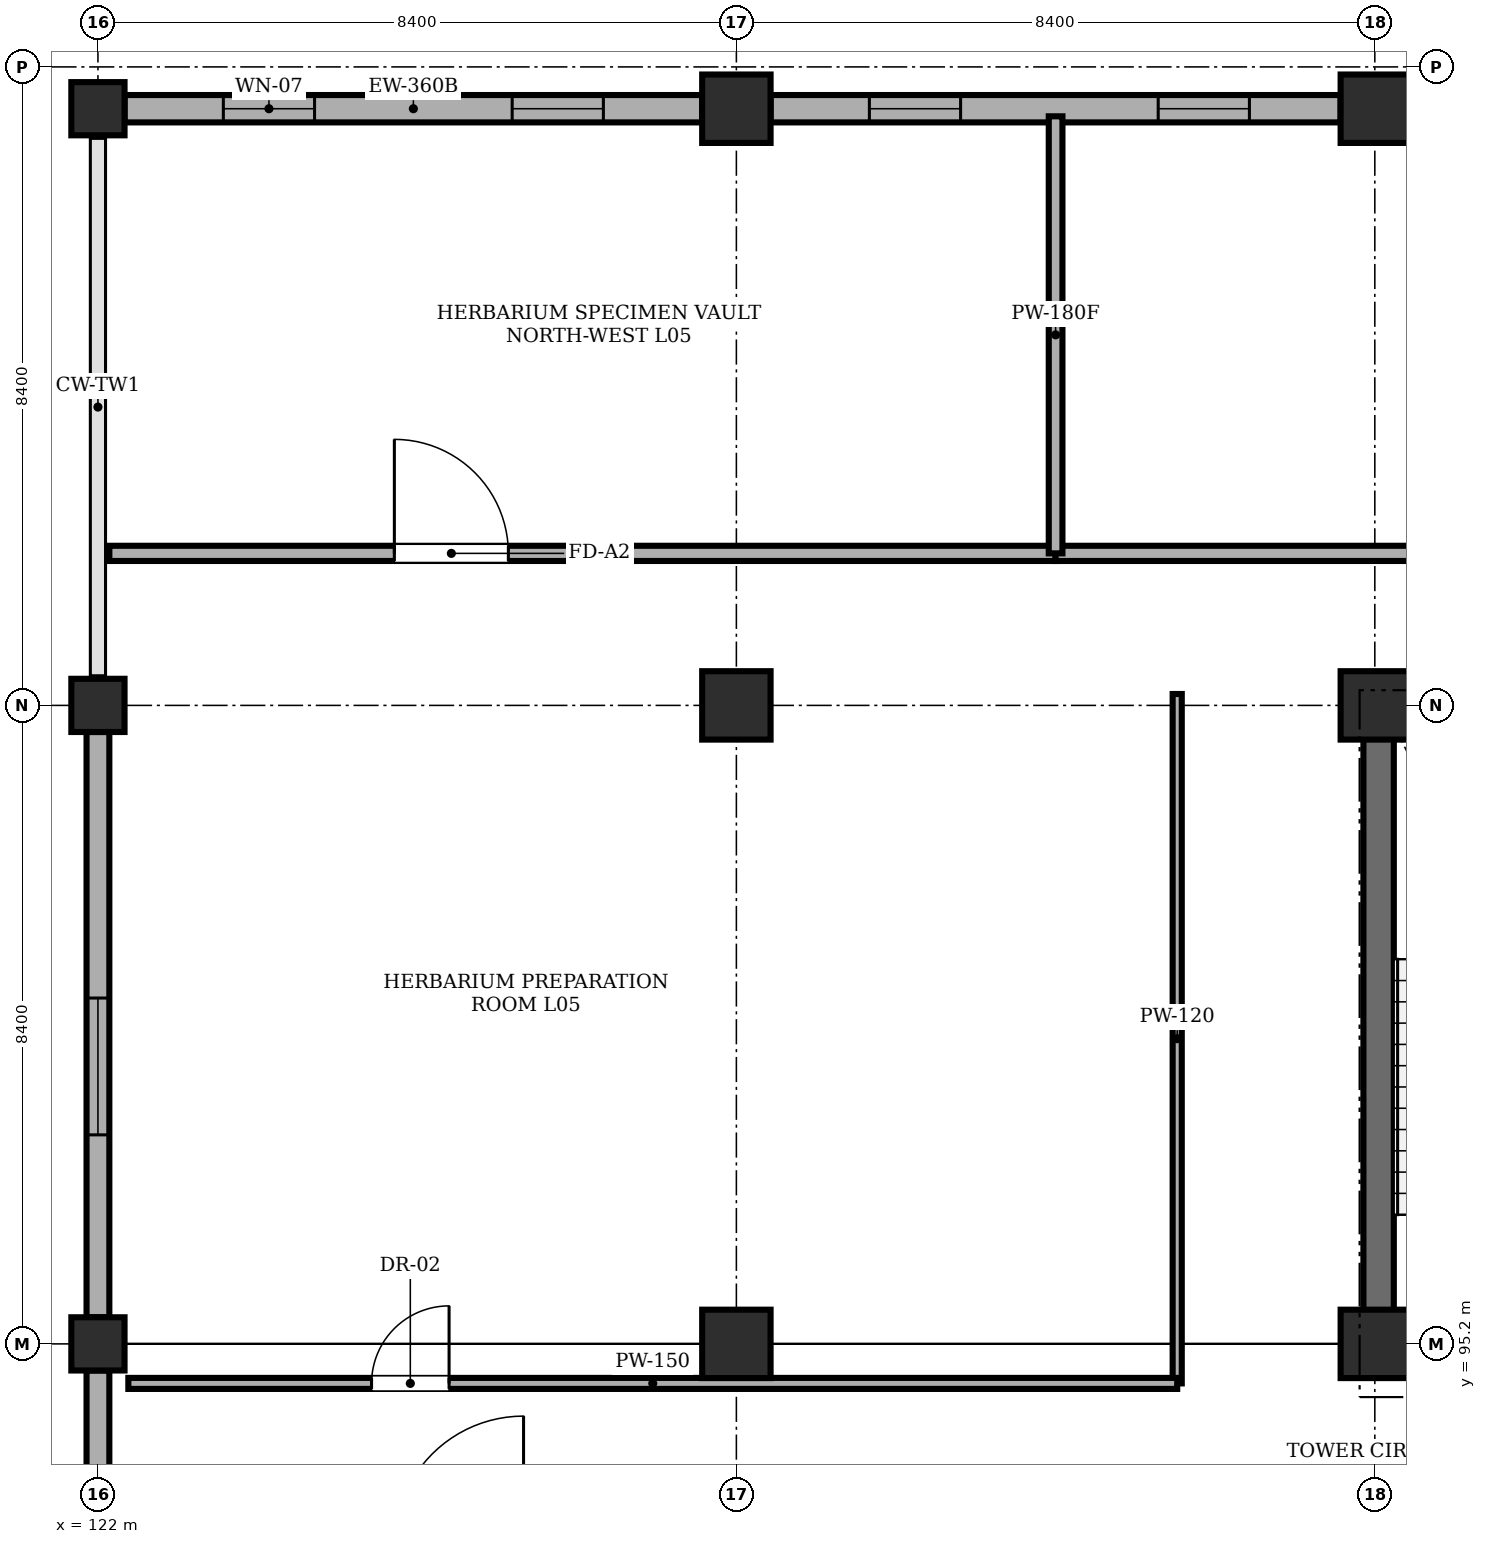
"""IFC4 building model, lengths in metres.
Left out: names, types, materials, properties, quantities, classifications, styles, units other than length and angle.
Written with IfcOpenShell. Run it as: python <this file> out.ifc"""

import sys

from ifc_helpers import new_model, si_unit, direction, frame, frame_2d, origin, origin_2d, place, context, subcontext, project, spatial, rectangle, extrude, element, fill, save


model = new_model("IFC4")
c1 = context("Model", 3, precision=1e-05, world=origin(), true_north=direction((0.0, 1.0)))
c2 = subcontext(c1, "Body", "Model", "MODEL_VIEW")
j1 = project(units=[si_unit("LENGTHUNIT", "METRE"), si_unit("PLANEANGLEUNIT", "RADIAN")], contexts=[c1])
p1 = place(None, origin())
s1 = spatial("IfcSite", under=j1, at=p1, CompositionType="ELEMENT")
p2 = place(p1, origin())
s2 = spatial("IfcBuilding", under=s1, at=p2, CompositionType="ELEMENT")
p3 = place(p2, frame((0.0, 0.0, 19.2)))
s3 = spatial("IfcBuildingStorey", under=s2, at=p3, CompositionType="ELEMENT", Elevation=19.2)
for number, where, z_axis, x_axis in (
    (1, (122.0, 95.2, 0.0), (0.0, 0.0, 1.0), (1.0, 0.0, 0.0)),
    (2, (122.0, 103.6, 0.0), (0.0, 0.0, 1.0), (1.0, 0.0, 0.0)),
    (3, (122.0, 111.45, 0.0), (0.0, 0.0, 1.0), (1.0, 0.0, 0.0)),
):
    element("IfcColumn", number, at=place(p3, frame(where, z_axis=z_axis, x_axis=x_axis)), inside=s3, PredefinedType="COLUMN", context=c2, shape_type="SweptSolid", body=[
        extrude(rectangle(XDim=0.7, YDim=0.7, at=origin_2d()), origin(), (0.0, 0.0, 1.0), 4.02),
    ])
for number, where, z_axis, x_axis in (
    (4, (130.4, 95.2, 0.0), (0.0, 0.0, 1.0), (1.0, 0.0, 0.0)),
    (5, (130.4, 103.6, 0.0), (0.0, 0.0, 1.0), (1.0, 0.0, 0.0)),
    (6, (130.4, 111.45, 0.0), (0.0, 0.0, 1.0), (1.0, 0.0, 0.0)),
    (7, (138.8, 95.2, 0.0), (0.0, 0.0, 1.0), (1.0, 0.0, 0.0)),
    (8, (138.8, 103.6, 0.0), (0.0, 0.0, 1.0), (1.0, 0.0, 0.0)),
    (9, (138.8, 111.45, 0.0), (0.0, 0.0, 1.0), (1.0, 0.0, 0.0)),
):
    element("IfcColumn", number, at=place(p3, frame(where, z_axis=z_axis, x_axis=x_axis)), inside=s3, PredefinedType="COLUMN", context=c2, shape_type="SweptSolid", body=[
        extrude(rectangle(XDim=0.9, YDim=0.9, at=origin_2d()), origin(), (0.0, 0.0, 1.0), 4.02),
    ])
for number, where, z_axis, x_axis in (
    (10, (138.65, 95.25, 0.0), (0.0, 0.0, 1.0), (1.0, 0.0, 0.0)),
    (11, (138.65, 103.55, 0.0), (0.0, 0.0, 1.0), (1.0, 0.0, 0.0)),
):
    element("IfcWall", number, at=place(p3, frame(where, z_axis=z_axis, x_axis=x_axis)), inside=s3, PredefinedType="SHEAR", context=c2, shape_type="SweptSolid", body=[
        extrude(rectangle(XDim=3.9, YDim=0.4, at=frame_2d((1.95, 0.0))), origin(), (0.0, 0.0, 1.0), 4.02),
    ])
p4 = place(p3, frame((138.85, 95.45, 0.0), z_axis=(0.0, 0.0, 1.0), x_axis=(0.0, 1.0, 0.0)))
e12 = element("IfcWall", 12, at=p4, inside=s3, PredefinedType="SHEAR", context=c2, shape_type="SweptSolid", body=[
    extrude(rectangle(XDim=7.9, YDim=0.4, at=frame_2d((3.95, 0.0))), origin(), (0.0, 0.0, 1.0), 4.02),
])
p5 = place(p3, frame((122.35, 111.45, 0.0), z_axis=(0.0, 0.0, 1.0), x_axis=(1.0, 0.0, 0.0)))
e13 = element("IfcWall", 13, at=p5, inside=s3, PredefinedType="STANDARD", context=c2, shape_type="SweptSolid", body=[
    extrude(rectangle(XDim=7.6, YDim=0.36, at=frame_2d((3.8, 0.0))), origin(), (0.0, 0.0, 1.0), 3.32),
])
p6 = place(p5, frame((1.3, 0.0, 1.1)))
e14 = element("IfcOpeningElement", 14, at=p6, cuts=e13, PredefinedType="OPENING", context=c2, shape_type="SweptSolid", body=[
    extrude(rectangle(XDim=1.2, YDim=1.5, at=frame_2d((0.6, 0.75))), frame((0.0, 0.19, 0.0), z_axis=(0.0, -1.0, 0.0), x_axis=(1.0, 0.0, 0.0)), (0.0, 0.0, 1.0), 0.38),
])
p7 = place(p5, frame((5.1, 0.0, 1.1)))
e15 = element("IfcOpeningElement", 15, at=p7, cuts=e13, PredefinedType="OPENING", context=c2, shape_type="SweptSolid", body=[
    extrude(rectangle(XDim=1.2, YDim=1.5, at=frame_2d((0.6, 0.75))), frame((0.0, 0.19, 0.0), z_axis=(0.0, -1.0, 0.0), x_axis=(1.0, 0.0, 0.0)), (0.0, 0.0, 1.0), 0.38),
])
p8 = place(p3, frame((130.85, 111.45, 0.0), z_axis=(0.0, 0.0, 1.0), x_axis=(1.0, 0.0, 0.0)))
e16 = element("IfcWall", 16, at=p8, inside=s3, PredefinedType="STANDARD", context=c2, shape_type="SweptSolid", body=[
    extrude(rectangle(XDim=7.5, YDim=0.36, at=frame_2d((3.75, 0.0))), origin(), (0.0, 0.0, 1.0), 3.32),
])
p9 = place(p8, frame((1.3, 0.0, 1.1)))
e17 = element("IfcOpeningElement", 17, at=p9, cuts=e16, PredefinedType="OPENING", context=c2, shape_type="SweptSolid", body=[
    extrude(rectangle(XDim=1.2, YDim=1.5, at=frame_2d((0.6, 0.75))), frame((0.0, 0.19, 0.0), z_axis=(0.0, -1.0, 0.0), x_axis=(1.0, 0.0, 0.0)), (0.0, 0.0, 1.0), 0.38),
])
p10 = place(p8, frame((5.1, 0.0, 1.1)))
e18 = element("IfcOpeningElement", 18, at=p10, cuts=e16, PredefinedType="OPENING", context=c2, shape_type="SweptSolid", body=[
    extrude(rectangle(XDim=1.2, YDim=1.5, at=frame_2d((0.6, 0.75))), frame((0.0, 0.19, 0.0), z_axis=(0.0, -1.0, 0.0), x_axis=(1.0, 0.0, 0.0)), (0.0, 0.0, 1.0), 0.38),
])
p11 = place(p3, frame((122.0, 87.15, 0.0), z_axis=(0.0, 0.0, 1.0), x_axis=(0.0, 1.0, 0.0)))
e19 = element("IfcWall", 19, at=p11, inside=s3, PredefinedType="STANDARD", context=c2, shape_type="SweptSolid", body=[
    extrude(rectangle(XDim=7.7, YDim=0.3, at=frame_2d((3.85, 0.0))), origin(), (0.0, 0.0, 1.0), 3.32),
])
p12 = place(p11, frame((2.4, 0.0, 0.95)))
e20 = element("IfcOpeningElement", 20, at=p12, cuts=e19, PredefinedType="OPENING", context=c2, shape_type="SweptSolid", body=[
    extrude(rectangle(XDim=1.5, YDim=1.8, at=frame_2d((0.75, 0.9))), frame((0.0, 0.16, 0.0), z_axis=(0.0, -1.0, 0.0), x_axis=(1.0, 0.0, 0.0)), (0.0, 0.0, 1.0), 0.32),
])
p13 = place(p3, frame((122.0, 95.55, 0.0), z_axis=(0.0, 0.0, 1.0), x_axis=(0.0, 1.0, 0.0)))
e21 = element("IfcWall", 21, at=p13, inside=s3, PredefinedType="STANDARD", context=c2, shape_type="SweptSolid", body=[
    extrude(rectangle(XDim=7.7, YDim=0.3, at=frame_2d((3.85, 0.0))), origin(), (0.0, 0.0, 1.0), 3.32),
])
p14 = place(p13, frame((2.4, 0.0, 1.0)))
e22 = element("IfcOpeningElement", 22, at=p14, cuts=e21, PredefinedType="OPENING", context=c2, shape_type="SweptSolid", body=[
    extrude(rectangle(XDim=1.8, YDim=1.8, at=frame_2d((0.9, 0.9))), frame((0.0, 0.16, 0.0), z_axis=(0.0, -1.0, 0.0), x_axis=(1.0, 0.0, 0.0)), (0.0, 0.0, 1.0), 0.32),
])
p15 = place(p3, frame((136.2, 94.68, 0.0), z_axis=(0.0, 0.0, 1.0), x_axis=(0.0, 1.0, 0.0)))
e23 = element("IfcWall", 23, at=p15, inside=s3, PredefinedType="PARTITIONING", context=c2, shape_type="SweptSolid", body=[
    extrude(rectangle(XDim=9.07, YDim=0.12, at=frame_2d((4.535, 0.0))), origin(), (0.0, 0.0, 1.0), 4.02),
])
p16 = place(p3, frame((122.4, 94.68, 0.0), z_axis=(0.0, 0.0, 1.0), x_axis=(1.0, 0.0, 0.0)))
e24 = element("IfcWall", 24, at=p16, inside=s3, PredefinedType="PARTITIONING", context=c2, shape_type="SweptSolid", body=[
    extrude(rectangle(XDim=13.8, YDim=0.145, at=frame_2d((6.9, 0.0))), origin(), (0.0, 0.0, 1.0), 4.02),
])
p17 = place(p16, frame((3.2, 0.0, 0.0)))
e25 = element("IfcOpeningElement", 25, at=p17, cuts=e24, PredefinedType="OPENING", context=c2, shape_type="SweptSolid", body=[
    extrude(rectangle(XDim=1.02, YDim=2.15, at=frame_2d((0.51, 1.075))), frame((0.0, 0.083, 0.0), z_axis=(0.0, -1.0, 0.0), x_axis=(1.0, 0.0, 0.0)), (0.0, 0.0, 1.0), 0.165),
])
p18 = place(p3, frame((122.15, 105.6, 0.0), z_axis=(0.0, 0.0, 1.0), x_axis=(1.0, 0.0, 0.0)))
e26 = element("IfcWall", 26, at=p18, inside=s3, PredefinedType="SOLIDWALL", context=c2, shape_type="SweptSolid", body=[
    extrude(rectangle(XDim=12.45, YDim=0.2, at=frame_2d((6.225, 0.0))), origin(), (0.0, 0.0, 1.0), 4.02),
])
p19 = place(p18, frame((3.75, 0.0, 0.0)))
e27 = element("IfcOpeningElement", 27, at=p19, cuts=e26, PredefinedType="OPENING", context=c2, shape_type="SweptSolid", body=[
    extrude(rectangle(XDim=1.5, YDim=2.2, at=frame_2d((0.75, 1.1))), frame((0.0, 0.11, 0.0), z_axis=(0.0, -1.0, 0.0), x_axis=(1.0, 0.0, 0.0)), (0.0, 0.0, 1.0), 0.22),
])
p20 = place(p3, frame((134.6, 105.6, 0.0), z_axis=(0.0, 0.0, 1.0), x_axis=(1.0, 0.0, 0.0)))
e28 = element("IfcWall", 28, at=p20, inside=s3, PredefinedType="SOLIDWALL", context=c2, shape_type="SweptSolid", body=[
    extrude(rectangle(XDim=16.8, YDim=0.2, at=frame_2d((8.4, 0.0))), origin(), (0.0, 0.0, 1.0), 4.02),
])
p21 = place(p20, frame((6.8, 0.0, 0.0)))
e29 = element("IfcOpeningElement", 29, at=p21, cuts=e28, PredefinedType="OPENING", context=c2, shape_type="SweptSolid", body=[
    extrude(rectangle(XDim=1.5, YDim=2.2, at=frame_2d((0.75, 1.1))), frame((0.0, 0.11, 0.0), z_axis=(0.0, -1.0, 0.0), x_axis=(1.0, 0.0, 0.0)), (0.0, 0.0, 1.0), 0.22),
])
p22 = place(p3, frame((134.6, 105.6, 0.0), z_axis=(0.0, 0.0, 1.0), x_axis=(0.0, 1.0, 0.0)))
e30 = element("IfcWall", 30, at=p22, inside=s3, PredefinedType="STANDARD", context=c2, shape_type="SweptSolid", body=[
    extrude(rectangle(XDim=5.75, YDim=0.18, at=frame_2d((2.875, 0.0))), origin(), (0.0, 0.0, 1.0), 3.52),
])
p23 = place(p6, origin())
e31 = element("IfcWindow", 31, at=p23, inside=s3, PartitioningType="SINGLE_PANEL", PredefinedType="WINDOW", context=c2, shape_type="SweptSolid", body=[
    extrude(rectangle(XDim=1.2, YDim=1.5, at=frame_2d((0.6, 0.75))), frame((0.0, 0.03, 0.0), z_axis=(0.0, -1.0, 0.0), x_axis=(1.0, 0.0, 0.0)), (0.0, 0.0, 1.0), 0.06),
])
fill(e14, e31)
p24 = place(p7, origin())
e32 = element("IfcWindow", 32, at=p24, inside=s3, PartitioningType="SINGLE_PANEL", PredefinedType="WINDOW", context=c2, shape_type="SweptSolid", body=[
    extrude(rectangle(XDim=1.2, YDim=1.5, at=frame_2d((0.6, 0.75))), frame((0.0, 0.03, 0.0), z_axis=(0.0, -1.0, 0.0), x_axis=(1.0, 0.0, 0.0)), (0.0, 0.0, 1.0), 0.06),
])
fill(e15, e32)
p25 = place(p9, origin())
e33 = element("IfcWindow", 33, at=p25, inside=s3, PartitioningType="SINGLE_PANEL", PredefinedType="WINDOW", context=c2, shape_type="SweptSolid", body=[
    extrude(rectangle(XDim=1.2, YDim=1.5, at=frame_2d((0.6, 0.75))), frame((0.0, 0.03, 0.0), z_axis=(0.0, -1.0, 0.0), x_axis=(1.0, 0.0, 0.0)), (0.0, 0.0, 1.0), 0.06),
])
fill(e17, e33)
p26 = place(p10, origin())
e34 = element("IfcWindow", 34, at=p26, inside=s3, PartitioningType="SINGLE_PANEL", PredefinedType="WINDOW", context=c2, shape_type="SweptSolid", body=[
    extrude(rectangle(XDim=1.2, YDim=1.5, at=frame_2d((0.6, 0.75))), frame((0.0, 0.03, 0.0), z_axis=(0.0, -1.0, 0.0), x_axis=(1.0, 0.0, 0.0)), (0.0, 0.0, 1.0), 0.06),
])
fill(e18, e34)
p27 = place(p14, origin())
e35 = element("IfcWindow", 35, at=p27, inside=s3, PartitioningType="DOUBLE_PANEL_VERTICAL", PredefinedType="WINDOW", context=c2, shape_type="SweptSolid", body=[
    extrude(rectangle(XDim=1.8, YDim=1.8, at=frame_2d((0.9, 0.9))), frame((0.0, 0.03, 0.0), z_axis=(0.0, -1.0, 0.0), x_axis=(1.0, 0.0, 0.0)), (0.0, 0.0, 1.0), 0.06),
])
fill(e22, e35)
p28 = place(p17, origin())
e36 = element("IfcDoor", 36, at=p28, inside=s3, OperationType="SINGLE_SWING_RIGHT", PredefinedType="DOOR", context=c2, shape_type="SweptSolid", body=[
    extrude(rectangle(XDim=1.02, YDim=2.15, at=frame_2d((0.51, 1.075))), frame((0.0, 0.025, 0.0), z_axis=(0.0, -1.0, 0.0), x_axis=(1.0, 0.0, 0.0)), (0.0, 0.0, 1.0), 0.05),
])
fill(e25, e36)
p29 = place(p19, origin())
e37 = element("IfcDoor", 37, at=p29, inside=s3, OperationType="SINGLE_SWING_LEFT", PredefinedType="DOOR", context=c2, shape_type="SweptSolid", body=[
    extrude(rectangle(XDim=1.5, YDim=2.2, at=frame_2d((0.75, 1.1))), frame((0.0, 0.025, 0.0), z_axis=(0.0, -1.0, 0.0), x_axis=(1.0, 0.0, 0.0)), (0.0, 0.0, 1.0), 0.05),
])
fill(e27, e37)
save(model, sys.argv[1])
